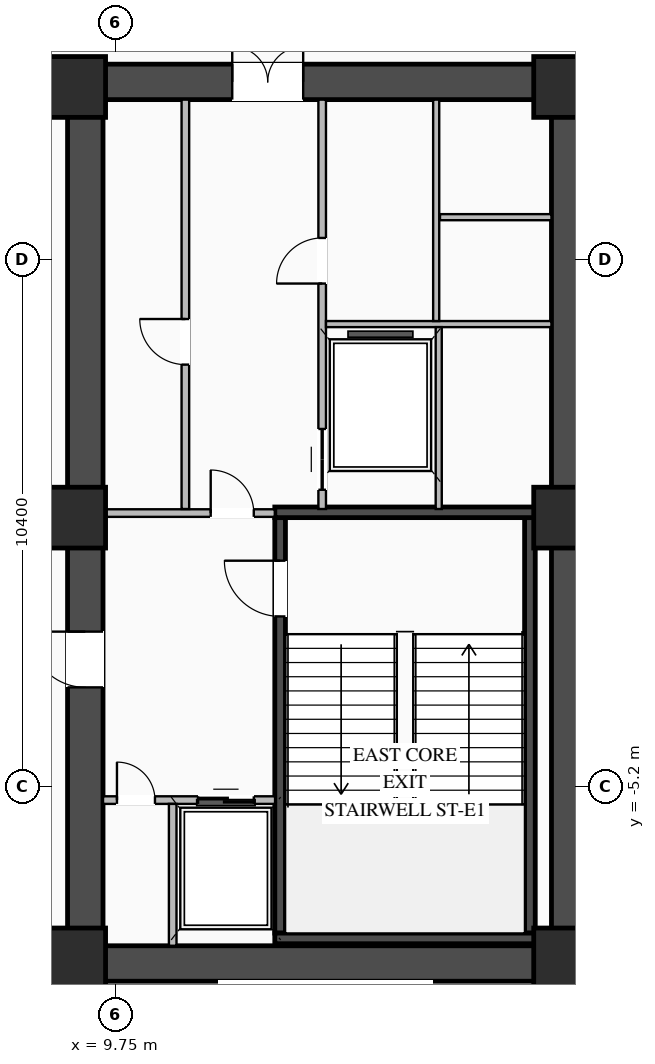
"""IFC4 building model, lengths in metres.
Left out: names, types, materials, properties, quantities, classifications, styles, units other than length and angle.
Written with IfcOpenShell. Run it as: python <this file> out.ifc"""

import sys

from ifc_helpers import new_model, si_unit, direction, frame, frame_2d, origin, origin_2d, place, context, subcontext, project, spatial, rectangle, extrude, element, fill, save


model = new_model("IFC4")
c1 = context("Model", 3, precision=1e-05, world=origin(), true_north=direction((0.0, 1.0)))
c2 = subcontext(c1, "Body", "Model", "MODEL_VIEW")
j1 = project(units=[si_unit("LENGTHUNIT", "METRE"), si_unit("PLANEANGLEUNIT", "RADIAN")], contexts=[c1])
p1 = place(None, origin())
s1 = spatial("IfcSite", under=j1, at=p1, CompositionType="ELEMENT")
p2 = place(p1, origin())
s2 = spatial("IfcBuilding", under=s1, at=p2, CompositionType="ELEMENT")
p3 = place(p2, frame((0.0, 0.0, -9.6)))
s3 = spatial("IfcBuildingStorey", under=s2, at=p3, CompositionType="ELEMENT", Elevation=-9.6)
p4 = place(p3, frame((8.8, -8.7, 0.0), z_axis=(0.0, 0.0, 1.0), x_axis=(1.0, 0.0, 0.0)))
e1 = element("IfcWall", 1, at=p4, inside=s3, PredefinedType="SHEAR", context=c2, shape_type="SweptSolid", body=[
    extrude(rectangle(XDim=10.25, YDim=0.7, at=frame_2d((5.125, 0.0))), origin(), (0.0, 0.0, 1.0), 4.5),
])
p5 = place(p3, frame((8.8, 8.7, 0.0), z_axis=(0.0, 0.0, 1.0), x_axis=(1.0, 0.0, 0.0)))
e2 = element("IfcWall", 2, at=p5, inside=s3, PredefinedType="SHEAR", context=c2, shape_type="SweptSolid", body=[
    extrude(rectangle(XDim=10.25, YDim=0.7, at=frame_2d((5.125, 0.0))), origin(), (0.0, 0.0, 1.0), 4.5),
])
p6 = place(p5, frame((3.25, 0.0, 0.0)))
e3 = element("IfcOpeningElement", 3, at=p6, cuts=e2, PredefinedType="OPENING", context=c2, shape_type="SweptSolid", body=[
    extrude(rectangle(XDim=1.4, YDim=2.05, at=frame_2d((0.7, 1.025))), frame((0.0, 0.36, 0.0), z_axis=(0.0, -1.0, 0.0), x_axis=(1.0, 0.0, 0.0)), (0.0, 0.0, 1.0), 0.72),
])
p7 = place(p3, frame((9.15, -8.35, 0.0), z_axis=(0.0, 0.0, 1.0), x_axis=(0.0, 1.0, 0.0)))
e4 = element("IfcWall", 4, at=p7, inside=s3, PredefinedType="SHEAR", context=c2, shape_type="SweptSolid", body=[
    extrude(rectangle(XDim=16.7, YDim=0.7, at=frame_2d((8.35, 0.0))), origin(), (0.0, 0.0, 1.0), 4.5),
])
p8 = place(p7, frame((5.1, 0.0, 0.0)))
e5 = element("IfcOpeningElement", 5, at=p8, cuts=e4, PredefinedType="OPENING", context=c2, shape_type="SweptSolid", body=[
    extrude(rectangle(XDim=1.1, YDim=2.08, at=frame_2d((0.55, 1.04))), frame((0.0, 0.36, 0.0), z_axis=(0.0, -1.0, 0.0), x_axis=(1.0, 0.0, 0.0)), (0.0, 0.0, 1.0), 0.72),
])
p9 = place(p3, frame((18.7, -8.35, 0.0), z_axis=(0.0, 0.0, 1.0), x_axis=(0.0, 1.0, 0.0)))
e6 = element("IfcWall", 6, at=p9, inside=s3, PredefinedType="SHEAR", context=c2, shape_type="SweptSolid", body=[
    extrude(rectangle(XDim=16.7, YDim=0.7, at=frame_2d((8.35, 0.0))), origin(), (0.0, 0.0, 1.0), 4.5),
])
p10 = place(p3, frame((12.995, -8.1, 0.0), z_axis=(0.0, 0.0, 1.0), x_axis=(0.0, 1.0, 0.0)))
e7 = element("IfcWall", 7, at=p10, inside=s3, PredefinedType="SHEAR", context=c2, shape_type="SweptSolid", body=[
    extrude(rectangle(XDim=8.2, YDim=0.21, at=frame_2d((4.1, 0.0))), origin(), (0.0, 0.0, 1.0), 4.5),
])
p11 = place(p10, frame((6.25, 0.0, 0.0)))
e8 = element("IfcOpeningElement", 8, at=p11, cuts=e7, PredefinedType="OPENING", context=c2, shape_type="SweptSolid", body=[
    extrude(rectangle(XDim=1.1, YDim=2.15, at=frame_2d((0.55, 1.075))), frame((0.0, 0.115, 0.0), z_axis=(0.0, -1.0, 0.0), x_axis=(1.0, 0.0, 0.0)), (0.0, 0.0, 1.0), 0.23),
])
p12 = place(p3, frame((17.925, -8.1, 0.0), z_axis=(0.0, 0.0, 1.0), x_axis=(0.0, 1.0, 0.0)))
e9 = element("IfcWall", 9, at=p12, inside=s3, PredefinedType="SHEAR", context=c2, shape_type="SweptSolid", body=[
    extrude(rectangle(XDim=8.2, YDim=0.21, at=frame_2d((4.1, 0.0))), origin(), (0.0, 0.0, 1.0), 4.5),
])
for number, where, z_axis, x_axis in (
    (10, (12.89, -8.205, 0.0), (0.0, 0.0, 1.0), (1.0, 0.0, 0.0)),
    (11, (18.03, 0.205, 0.0), (0.0, 0.0, 1.0), (-1.0, 0.0, 0.0)),
):
    element("IfcWall", number, at=place(p3, frame(where, z_axis=z_axis, x_axis=x_axis)), inside=s3, PredefinedType="SHEAR", context=c2, shape_type="SweptSolid", body=[
        extrude(rectangle(XDim=5.14, YDim=0.21, at=frame_2d((2.57, 0.0))), origin(), (0.0, 0.0, 1.0), 4.5),
    ])
for number, where, z_axis, x_axis in (
    (12, (8.95, -8.6, 0.0), (0.0, 0.0, 1.0), (1.0, 0.0, 0.0)),
    (13, (8.95, 0.1, 0.0), (0.0, 0.0, 1.0), (1.0, 0.0, 0.0)),
    (14, (8.95, 8.6, 0.0), (0.0, 0.0, 1.0), (1.0, 0.0, 0.0)),
    (15, (18.6, -8.6, 0.0), (0.0, 0.0, 1.0), (1.0, 0.0, 0.0)),
    (16, (18.6, 0.1, 0.0), (0.0, 0.0, 1.0), (1.0, 0.0, 0.0)),
    (17, (18.6, 8.6, 0.0), (0.0, 0.0, 1.0), (1.0, 0.0, 0.0)),
):
    element("IfcColumn", number, at=place(p3, frame(where, z_axis=z_axis, x_axis=x_axis)), inside=s3, PredefinedType="COLUMN", context=c2, shape_type="SweptSolid", body=[
        extrude(rectangle(XDim=1.2, YDim=1.2, at=origin_2d()), origin(), (0.0, 0.0, 1.0), 4.8),
    ])
p13 = place(p3, frame((9.5, -5.475, 0.0), z_axis=(0.0, 0.0, 1.0), x_axis=(1.0, 0.0, 0.0)))
e18 = element("IfcWall", 18, at=p13, inside=s3, PredefinedType="STANDARD", context=c2, shape_type="SweptSolid", body=[
    extrude(rectangle(XDim=3.395, YDim=0.15, at=frame_2d((1.698, 0.0))), origin(), (0.0, 0.0, 1.0), 4.48),
])
p14 = place(p13, frame((1.875, 0.0, 0.0)))
e19 = element("IfcOpeningElement", 19, at=p14, cuts=e18, PredefinedType="OPENING", context=c2, shape_type="SweptSolid", body=[
    extrude(rectangle(XDim=1.1, YDim=2.15, at=frame_2d((0.55, 1.075))), frame((0.0, 0.085, 0.0), z_axis=(0.0, -1.0, 0.0), x_axis=(1.0, 0.0, 0.0)), (0.0, 0.0, 1.0), 0.17),
])
p15 = place(p13, frame((0.275, 0.0, 0.0)))
e20 = element("IfcOpeningElement", 20, at=p15, cuts=e18, PredefinedType="OPENING", context=c2, shape_type="SweptSolid", body=[
    extrude(rectangle(XDim=0.75, YDim=2.05, at=frame_2d((0.375, 1.025))), frame((0.0, 0.085, 0.0), z_axis=(0.0, -1.0, 0.0), x_axis=(1.0, 0.0, 0.0)), (0.0, 0.0, 1.0), 0.17),
])
p16 = place(p3, frame((10.875, -8.35, 0.0), z_axis=(0.0, 0.0, 1.0), x_axis=(0.0, 1.0, 0.0)))
e21 = element("IfcWall", 21, at=p16, inside=s3, PredefinedType="STANDARD", context=c2, shape_type="SweptSolid", body=[
    extrude(rectangle(XDim=2.8, YDim=0.15, at=frame_2d((1.4, 0.0))), origin(), (0.0, 0.0, 1.0), 4.48),
])
p17 = place(p3, frame((9.5, 0.19, 0.0), z_axis=(0.0, 0.0, 1.0), x_axis=(1.0, 0.0, 0.0)))
e22 = element("IfcWall", 22, at=p17, inside=s3, PredefinedType="STANDARD", context=c2, shape_type="SweptSolid", body=[
    extrude(rectangle(XDim=3.39, YDim=0.15, at=frame_2d((1.695, 0.0))), origin(), (0.0, 0.0, 1.0), 3.675),
])
p18 = place(p17, frame((2.125, 0.0, 0.0)))
e23 = element("IfcOpeningElement", 23, at=p18, cuts=e22, PredefinedType="OPENING", context=c2, shape_type="SweptSolid", body=[
    extrude(rectangle(XDim=0.85, YDim=2.04, at=frame_2d((0.425, 1.02))), frame((0.0, 0.085, 0.0), z_axis=(0.0, -1.0, 0.0), x_axis=(1.0, 0.0, 0.0)), (0.0, 0.0, 1.0), 0.17),
])
p19 = place(p3, frame((11.125, 0.27, 0.0), z_axis=(0.0, 0.0, 1.0), x_axis=(0.0, 1.0, 0.0)))
e24 = element("IfcWall", 24, at=p19, inside=s3, PredefinedType="STANDARD", context=c2, shape_type="SweptSolid", body=[
    extrude(rectangle(XDim=8.08, YDim=0.15, at=frame_2d((4.04, 0.0))), origin(), (0.0, 0.0, 1.0), 4.48),
])
p20 = place(p19, frame((2.85, 0.0, 0.0)))
e25 = element("IfcOpeningElement", 25, at=p20, cuts=e24, PredefinedType="OPENING", context=c2, shape_type="SweptSolid", body=[
    extrude(rectangle(XDim=0.9, YDim=2.05, at=frame_2d((0.45, 1.025))), frame((0.0, 0.085, 0.0), z_axis=(0.0, -1.0, 0.0), x_axis=(1.0, 0.0, 0.0)), (0.0, 0.0, 1.0), 0.17),
])
p21 = place(p3, frame((13.825, 0.27, 0.0), z_axis=(0.0, 0.0, 1.0), x_axis=(0.0, 1.0, 0.0)))
e26 = element("IfcWall", 26, at=p21, inside=s3, PredefinedType="STANDARD", context=c2, shape_type="SweptSolid", body=[
    extrude(rectangle(XDim=8.08, YDim=0.15, at=frame_2d((4.04, 0.0))), origin(), (0.0, 0.0, 1.0), 4.48),
])
p22 = place(p21, frame((4.45, 0.0, 0.0)))
e27 = element("IfcOpeningElement", 27, at=p22, cuts=e26, PredefinedType="OPENING", context=c2, shape_type="SweptSolid", body=[
    extrude(rectangle(XDim=0.9, YDim=2.05, at=frame_2d((0.45, 1.025))), frame((0.0, 0.085, 0.0), z_axis=(0.0, -1.0, 0.0), x_axis=(1.0, 0.0, 0.0)), (0.0, 0.0, 1.0), 0.17),
])
p23 = place(p21, frame((0.38, 0.0, 0.0)))
e28 = element("IfcOpeningElement", 28, at=p23, cuts=e26, PredefinedType="OPENING", context=c2, shape_type="SweptSolid", body=[
    extrude(rectangle(XDim=1.2, YDim=2.1, at=frame_2d((0.6, 1.05))), frame((0.0, 0.085, 0.0), z_axis=(0.0, -1.0, 0.0), x_axis=(1.0, 0.0, 0.0)), (0.0, 0.0, 1.0), 0.17),
])
p24 = place(p3, frame((13.9, 3.92, 0.0), z_axis=(0.0, 0.0, 1.0), x_axis=(1.0, 0.0, 0.0)))
e29 = element("IfcWall", 29, at=p24, inside=s3, PredefinedType="STANDARD", context=c2, shape_type="SweptSolid", body=[
    extrude(rectangle(XDim=4.45, YDim=0.12, at=frame_2d((2.225, 0.0))), origin(), (0.0, 0.0, 1.0), 4.48),
])
p25 = place(p3, frame((16.15, 6.03, 0.0), z_axis=(0.0, 0.0, 1.0), x_axis=(1.0, 0.0, 0.0)))
e30 = element("IfcWall", 30, at=p25, inside=s3, PredefinedType="STANDARD", context=c2, shape_type="SweptSolid", body=[
    extrude(rectangle(XDim=2.2, YDim=0.12, at=frame_2d((1.1, 0.0))), origin(), (0.0, 0.0, 1.0), 4.48),
])
p26 = place(p3, frame((16.075, 3.98, 0.0), z_axis=(0.0, 0.0, 1.0), x_axis=(0.0, 1.0, 0.0)))
e31 = element("IfcWall", 31, at=p26, inside=s3, PredefinedType="STANDARD", context=c2, shape_type="SweptSolid", body=[
    extrude(rectangle(XDim=4.37, YDim=0.12, at=frame_2d((2.185, 0.0))), origin(), (0.0, 0.0, 1.0), 4.48),
])
p27 = place(p3, frame((16.125, 0.27, 0.0), z_axis=(0.0, 0.0, 1.0), x_axis=(0.0, 1.0, 0.0)))
e32 = element("IfcWall", 32, at=p27, inside=s3, PredefinedType="STANDARD", context=c2, shape_type="SweptSolid", body=[
    extrude(rectangle(XDim=3.59, YDim=0.12, at=frame_2d((1.795, 0.0))), origin(), (0.0, 0.0, 1.0), 4.48),
])
p28 = place(p11, origin())
e33 = element("IfcDoor", 33, at=p28, inside=s3, OperationType="SINGLE_SWING_RIGHT", PredefinedType="DOOR", context=c2, shape_type="SweptSolid", body=[
    extrude(rectangle(XDim=1.1, YDim=2.15, at=frame_2d((0.55, 1.075))), frame((0.0, 0.025, 0.0), z_axis=(0.0, -1.0, 0.0), x_axis=(1.0, 0.0, 0.0)), (0.0, 0.0, 1.0), 0.05),
])
fill(e8, e33)
p29 = place(p14, origin())
e34 = element("IfcDoor", 34, at=p29, inside=s3, OperationType="DOUBLE_DOOR_SLIDING", PredefinedType="DOOR", context=c2, shape_type="SweptSolid", body=[
    extrude(rectangle(XDim=1.1, YDim=2.15, at=frame_2d((0.55, 1.075))), frame((0.0, 0.025, 0.0), z_axis=(0.0, -1.0, 0.0), x_axis=(1.0, 0.0, 0.0)), (0.0, 0.0, 1.0), 0.05),
])
fill(e19, e34)
p30 = place(p15, origin())
e35 = element("IfcDoor", 35, at=p30, inside=s3, OperationType="SINGLE_SWING_LEFT", PredefinedType="DOOR", context=c2, shape_type="SweptSolid", body=[
    extrude(rectangle(XDim=0.75, YDim=2.05, at=frame_2d((0.375, 1.025))), frame((0.0, 0.025, 0.0), z_axis=(0.0, -1.0, 0.0), x_axis=(1.0, 0.0, 0.0)), (0.0, 0.0, 1.0), 0.05),
])
fill(e20, e35)
p31 = place(p18, origin())
e36 = element("IfcDoor", 36, at=p31, inside=s3, OperationType="SINGLE_SWING_LEFT", PredefinedType="DOOR", context=c2, shape_type="SweptSolid", body=[
    extrude(rectangle(XDim=0.85, YDim=2.04, at=frame_2d((0.425, 1.02))), frame((0.0, 0.025, 0.0), z_axis=(0.0, -1.0, 0.0), x_axis=(1.0, 0.0, 0.0)), (0.0, 0.0, 1.0), 0.05),
])
fill(e23, e36)
p32 = place(p8, origin())
e37 = element("IfcDoor", 37, at=p32, inside=s3, OperationType="SINGLE_SWING_RIGHT", PredefinedType="DOOR", context=c2, shape_type="SweptSolid", body=[
    extrude(rectangle(XDim=1.1, YDim=2.08, at=frame_2d((0.55, 1.04))), frame((0.0, -0.255, 0.0), z_axis=(0.0, -1.0, 0.0), x_axis=(1.0, 0.0, 0.0)), (0.0, 0.0, 1.0), 0.05),
])
fill(e5, e37)
p33 = place(p6, origin())
e38 = element("IfcDoor", 38, at=p33, inside=s3, OperationType="DOUBLE_DOOR_SINGLE_SWING", PredefinedType="DOOR", context=c2, shape_type="SweptSolid", body=[
    extrude(rectangle(XDim=1.4, YDim=2.05, at=frame_2d((0.7, 1.025))), frame((0.0, 0.295, 0.0), z_axis=(0.0, -1.0, 0.0), x_axis=(1.0, 0.0, 0.0)), (0.0, 0.0, 1.0), 0.05),
])
fill(e3, e38)
p34 = place(p20, origin())
e39 = element("IfcDoor", 39, at=p34, inside=s3, OperationType="SINGLE_SWING_RIGHT", PredefinedType="DOOR", context=c2, shape_type="SweptSolid", body=[
    extrude(rectangle(XDim=0.9, YDim=2.05, at=frame_2d((0.45, 1.025))), frame((0.0, 0.025, 0.0), z_axis=(0.0, -1.0, 0.0), x_axis=(1.0, 0.0, 0.0)), (0.0, 0.0, 1.0), 0.05),
])
fill(e25, e39)
p35 = place(p22, origin())
e40 = element("IfcDoor", 40, at=p35, inside=s3, OperationType="SINGLE_SWING_LEFT", PredefinedType="DOOR", context=c2, shape_type="SweptSolid", body=[
    extrude(rectangle(XDim=0.9, YDim=2.05, at=frame_2d((0.45, 1.025))), frame((0.0, 0.025, 0.0), z_axis=(0.0, -1.0, 0.0), x_axis=(1.0, 0.0, 0.0)), (0.0, 0.0, 1.0), 0.05),
])
fill(e27, e40)
p36 = place(p23, origin())
e41 = element("IfcDoor", 41, at=p36, inside=s3, OperationType="DOUBLE_DOOR_SLIDING", PredefinedType="DOOR", context=c2, shape_type="SweptSolid", body=[
    extrude(rectangle(XDim=1.2, YDim=2.1, at=frame_2d((0.6, 1.05))), frame((0.0, 0.025, 0.0), z_axis=(0.0, -1.0, 0.0), x_axis=(1.0, 0.0, 0.0)), (0.0, 0.0, 1.0), 0.05),
])
fill(e28, e41)
save(model, sys.argv[1])
